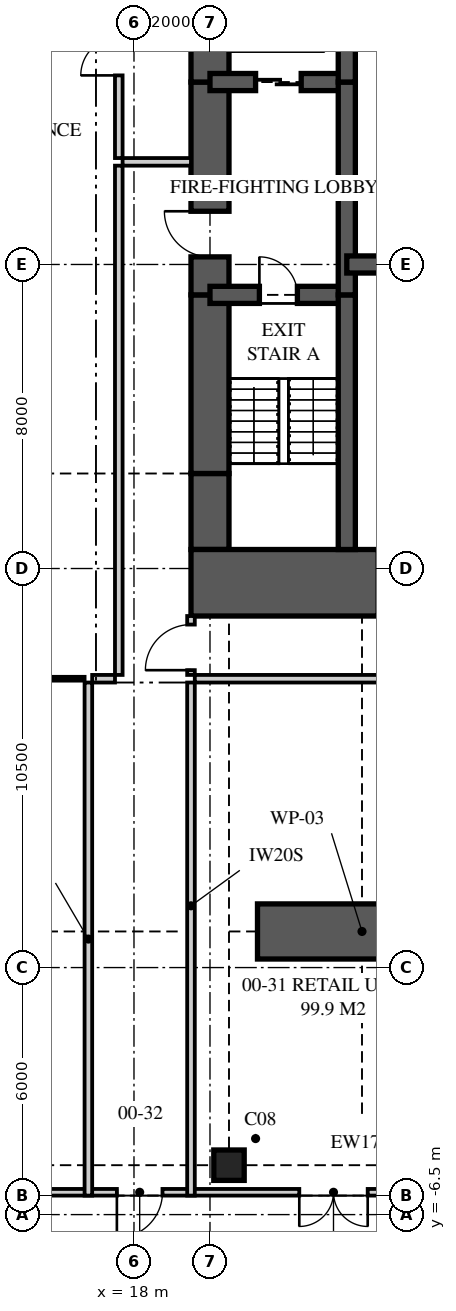
"""IFC4 building model, lengths in metres.
Left out: names, types, materials, properties, quantities, classifications, styles, units other than length and angle.
Written with IfcOpenShell. Run it as: python <this file> out.ifc"""

import sys

from ifc_helpers import new_model, si_unit, direction, frame, frame_2d, origin, origin_2d, place, context, subcontext, project, spatial, polyline, rectangle, outline, extrude, element, fill, save


model = new_model("IFC4")
c1 = context("Model", 3, precision=1e-05, world=origin(), true_north=direction((0.0, 1.0)))
c2 = subcontext(c1, "Body", "Model", "MODEL_VIEW")
j1 = project(units=[si_unit("LENGTHUNIT", "METRE"), si_unit("PLANEANGLEUNIT", "RADIAN")], contexts=[c1])
p1 = place(None, origin())
s1 = spatial("IfcSite", under=j1, at=p1, CompositionType="ELEMENT")
p2 = place(p1, origin())
s2 = spatial("IfcBuilding", under=s1, at=p2, CompositionType="ELEMENT")
p3 = place(p2, origin())
s3 = spatial("IfcBuildingStorey", under=s2, at=p3, CompositionType="ELEMENT", Elevation=0.0)
p4 = place(p3, frame((20.5, -5.2, 0.0), z_axis=(0.0, 0.0, 1.0), x_axis=(1.0, 0.0, 0.0)))
e1 = element("IfcColumn", 1, at=p4, inside=s3, PredefinedType="COLUMN", context=c2, shape_type="SweptSolid", body=[
    extrude(rectangle(XDim=0.8, YDim=0.8, at=origin_2d()), origin(), (0.0, 0.0, 1.0), 6.0),
])
p5 = place(p3, frame((19.5, 10.125, 0.0), z_axis=(0.0, 0.0, 1.0), x_axis=(1.0, 0.0, 0.0)))
e2 = element("IfcWall", 2, at=p5, inside=s3, PredefinedType="SHEAR", context=c2, shape_type="SweptSolid", body=[
    extrude(rectangle(XDim=6.5, YDim=1.75, at=frame_2d((3.25, 0.0))), origin(), (0.0, 0.0, 1.0), 6.0),
])
p6 = place(p5, frame((4.925, 0.0, 0.0)))
e3 = element("IfcOpeningElement", 3, at=p6, cuts=e2, PredefinedType="OPENING", context=c2, shape_type="SweptSolid", body=[
    extrude(rectangle(XDim=0.75, YDim=2.1, at=frame_2d((0.375, 1.05))), frame((0.0, 0.885, 0.0), z_axis=(0.0, -1.0, 0.0), x_axis=(1.0, 0.0, 0.0)), (0.0, 0.0, 1.0), 1.77),
])
p7 = place(p3, frame((20.0, 26.0, 0.0), z_axis=(0.0, 0.0, 1.0), x_axis=(0.0, -1.0, 0.0)))
e4 = element("IfcWall", 4, at=p7, inside=s3, PredefinedType="SHEAR", context=c2, shape_type="SweptSolid", body=[
    extrude(rectangle(XDim=2.7, YDim=1.0, at=frame_2d((1.35, 0.0))), origin(), (0.0, 0.0, 1.0), 6.0),
])
p8 = place(p3, frame((20.0, 23.3, 0.0), z_axis=(0.0, 0.0, 1.0), x_axis=(0.0, -1.0, 0.0)))
e5 = element("IfcWall", 5, at=p8, inside=s3, PredefinedType="SHEAR", context=c2, shape_type="SweptSolid", body=[
    extrude(rectangle(XDim=5.6, YDim=1.0, at=frame_2d((2.8, 0.0))), origin(), (0.0, 0.0, 1.0), 6.0),
])
p9 = place(p8, frame((3.4, 0.0, 0.0)))
e6 = element("IfcOpeningElement", 6, at=p9, cuts=e5, PredefinedType="OPENING", context=c2, shape_type="SweptSolid", body=[
    extrude(rectangle(XDim=1.2, YDim=2.2, at=frame_2d((0.6, 1.1))), frame((0.0, 0.51, 0.0), z_axis=(0.0, -1.0, 0.0), x_axis=(1.0, 0.0, 0.0)), (0.0, 0.0, 1.0), 1.02),
])
p10 = place(p3, frame((20.0, 17.7, 0.0), z_axis=(0.0, 0.0, 1.0), x_axis=(0.0, -1.0, 0.0)))
e7 = element("IfcWall", 7, at=p10, inside=s3, PredefinedType="SHEAR", context=c2, shape_type="SweptSolid", body=[
    extrude(rectangle(XDim=4.7, YDim=1.0, at=frame_2d((2.35, 0.0))), origin(), (0.0, 0.0, 1.0), 6.0),
])
p11 = place(p3, frame((20.0, 13.0, 0.0), z_axis=(0.0, 0.0, 1.0), x_axis=(0.0, -1.0, 0.0)))
e8 = element("IfcWall", 8, at=p11, inside=s3, PredefinedType="SHEAR", context=c2, shape_type="SweptSolid", body=[
    extrude(rectangle(XDim=2.0, YDim=1.0, at=frame_2d((1.0, 0.0))), origin(), (0.0, 0.0, 1.0), 6.0),
])
p12 = place(p3, frame((23.6, 11.0, 0.0), z_axis=(0.0, 0.0, 1.0), x_axis=(0.0, 1.0, 0.0)))
e9 = element("IfcWall", 9, at=p12, inside=s3, PredefinedType="SHEAR", context=c2, shape_type="SweptSolid", body=[
    extrude(rectangle(XDim=6.7, YDim=0.45, at=frame_2d((3.35, 0.0))), origin(), (0.0, 0.0, 1.0), 6.0),
])
p13 = place(p3, frame((23.6, 17.7, 0.0), z_axis=(0.0, 0.0, 1.0), x_axis=(0.0, 1.0, 0.0)))
e10 = element("IfcWall", 10, at=p13, inside=s3, PredefinedType="SHEAR", context=c2, shape_type="SweptSolid", body=[
    extrude(rectangle(XDim=5.6, YDim=0.45, at=frame_2d((2.8, 0.0))), origin(), (0.0, 0.0, 1.0), 6.0),
])
p14 = place(p3, frame((23.6, 23.3, 0.0), z_axis=(0.0, 0.0, 1.0), x_axis=(0.0, 1.0, 0.0)))
e11 = element("IfcWall", 11, at=p14, inside=s3, PredefinedType="SHEAR", context=c2, shape_type="SweptSolid", body=[
    extrude(rectangle(XDim=2.7, YDim=0.45, at=frame_2d((1.35, 0.0))), origin(), (0.0, 0.0, 1.0), 6.0),
])
p15 = place(p3, frame((20.0, 17.7, 0.0), z_axis=(0.0, 0.0, 1.0), x_axis=(1.0, 0.0, 0.0)))
e12 = element("IfcWall", 12, at=p15, inside=s3, PredefinedType="SHEAR", context=c2, shape_type="SweptSolid", body=[
    extrude(rectangle(XDim=3.6, YDim=0.45, at=frame_2d((1.8, 0.0))), origin(), (0.0, 0.0, 1.0), 6.0),
])
p16 = place(p15, frame((1.3, 0.0, 0.0)))
e13 = element("IfcOpeningElement", 13, at=p16, cuts=e12, PredefinedType="OPENING", context=c2, shape_type="SweptSolid", body=[
    extrude(rectangle(XDim=1.0, YDim=2.1, at=frame_2d((0.5, 1.05))), frame((0.0, 0.235, 0.0), z_axis=(0.0, -1.0, 0.0), x_axis=(1.0, 0.0, 0.0)), (0.0, 0.0, 1.0), 0.47),
])
p17 = place(p3, frame((20.0, 23.3, 0.0), z_axis=(0.0, 0.0, 1.0), x_axis=(1.0, 0.0, 0.0)))
e14 = element("IfcWall", 14, at=p17, inside=s3, PredefinedType="SHEAR", context=c2, shape_type="SweptSolid", body=[
    extrude(rectangle(XDim=3.6, YDim=0.45, at=frame_2d((1.8, 0.0))), origin(), (0.0, 0.0, 1.0), 6.0),
])
p18 = place(p17, frame((1.2, 0.0, 0.0)))
e15 = element("IfcOpeningElement", 15, at=p18, cuts=e14, PredefinedType="OPENING", context=c2, shape_type="SweptSolid", body=[
    extrude(rectangle(XDim=1.2, YDim=2.1, at=frame_2d((0.6, 1.05))), frame((0.0, 0.235, 0.0), z_axis=(0.0, -1.0, 0.0), x_axis=(1.0, 0.0, 0.0)), (0.0, 0.0, 1.0), 0.47),
])
p19 = place(p3, frame((23.6, 18.5, 0.0), z_axis=(0.0, 0.0, 1.0), x_axis=(1.0, 0.0, 0.0)))
e16 = element("IfcWall", 16, at=p19, inside=s3, PredefinedType="SHEAR", context=c2, shape_type="SweptSolid", body=[
    extrude(rectangle(XDim=2.4, YDim=0.45, at=frame_2d((1.2, 0.0))), origin(), (0.0, 0.0, 1.0), 6.0),
])
p20 = place(p3, frame((-9.2, -5.913, 0.0), z_axis=(0.0, 0.0, 1.0), x_axis=(1.0, 0.0, 0.0)))
e17 = element("IfcWall", 17, at=p20, inside=s3, PredefinedType="SOLIDWALL", context=c2, shape_type="SweptSolid", body=[
    extrude(rectangle(XDim=68.4, YDim=0.175, at=frame_2d((34.2, 0.0))), origin(), (0.0, 0.0, 1.0), 5.12),
])
p21 = place(p20, frame((4.819, 0.0, 0.0)))
e18 = element("IfcOpeningElement", 18, at=p21, cuts=e17, PredefinedType="OPENING", context=c2, shape_type="SweptSolid", body=[
    extrude(rectangle(XDim=1.8, YDim=2.7, at=frame_2d((0.9, 1.35))), frame((0.0, 0.097, 0.0), z_axis=(0.0, -1.0, 0.0), x_axis=(1.0, 0.0, 0.0)), (0.0, 0.0, 1.0), 0.195),
])
p22 = place(p20, frame((0.871, 0.0, 0.3)))
e19 = element("IfcOpeningElement", 19, at=p22, cuts=e17, PredefinedType="OPENING", context=c2, shape_type="SweptSolid", body=[
    extrude(rectangle(XDim=2.4, YDim=3.0, at=frame_2d((1.2, 1.5))), frame((0.0, 0.097, 0.0), z_axis=(0.0, -1.0, 0.0), x_axis=(1.0, 0.0, 0.0)), (0.0, 0.0, 1.0), 0.195),
])
p23 = place(p20, frame((8.334, 0.0, 0.3)))
e20 = element("IfcOpeningElement", 20, at=p23, cuts=e17, PredefinedType="OPENING", context=c2, shape_type="SweptSolid", body=[
    extrude(rectangle(XDim=2.4, YDim=3.0, at=frame_2d((1.2, 1.5))), frame((0.0, 0.097, 0.0), z_axis=(0.0, -1.0, 0.0), x_axis=(1.0, 0.0, 0.0)), (0.0, 0.0, 1.0), 0.195),
])
p24 = place(p20, frame((14.45, 0.0, 0.0)))
e21 = element("IfcOpeningElement", 21, at=p24, cuts=e17, PredefinedType="OPENING", context=c2, shape_type="SweptSolid", body=[
    extrude(rectangle(XDim=2.0, YDim=2.7, at=frame_2d((1.0, 1.35))), frame((0.0, 0.097, 0.0), z_axis=(0.0, -1.0, 0.0), x_axis=(1.0, 0.0, 0.0)), (0.0, 0.0, 1.0), 0.195),
])
p25 = place(p20, frame((22.17, 0.0, 0.0)))
e22 = element("IfcOpeningElement", 22, at=p25, cuts=e17, PredefinedType="OPENING", context=c2, shape_type="SweptSolid", body=[
    extrude(rectangle(XDim=1.8, YDim=2.7, at=frame_2d((0.9, 1.35))), frame((0.0, 0.097, 0.0), z_axis=(0.0, -1.0, 0.0), x_axis=(1.0, 0.0, 0.0)), (0.0, 0.0, 1.0), 0.195),
])
p26 = place(p20, frame((26.75, 0.0, 0.0)))
e23 = element("IfcOpeningElement", 23, at=p26, cuts=e17, PredefinedType="OPENING", context=c2, shape_type="SweptSolid", body=[
    extrude(rectangle(XDim=1.2, YDim=2.1, at=frame_2d((0.6, 1.05))), frame((0.0, 0.097, 0.0), z_axis=(0.0, -1.0, 0.0), x_axis=(1.0, 0.0, 0.0)), (0.0, 0.0, 1.0), 0.195),
])
p27 = place(p20, frame((31.55, 0.0, 0.0)))
e24 = element("IfcOpeningElement", 24, at=p27, cuts=e17, PredefinedType="OPENING", context=c2, shape_type="SweptSolid", body=[
    extrude(rectangle(XDim=1.8, YDim=2.7, at=frame_2d((0.9, 1.35))), frame((0.0, 0.097, 0.0), z_axis=(0.0, -1.0, 0.0), x_axis=(1.0, 0.0, 0.0)), (0.0, 0.0, 1.0), 0.195),
])
p28 = place(p20, frame((40.85, 0.0, 0.0)))
e25 = element("IfcOpeningElement", 25, at=p28, cuts=e17, PredefinedType="OPENING", context=c2, shape_type="SweptSolid", body=[
    extrude(rectangle(XDim=1.8, YDim=2.7, at=frame_2d((0.9, 1.35))), frame((0.0, 0.097, 0.0), z_axis=(0.0, -1.0, 0.0), x_axis=(1.0, 0.0, 0.0)), (0.0, 0.0, 1.0), 0.195),
])
p29 = place(p20, frame((43.445, 0.0, 0.3)))
e26 = element("IfcOpeningElement", 26, at=p29, cuts=e17, PredefinedType="OPENING", context=c2, shape_type="SweptSolid", body=[
    extrude(rectangle(XDim=2.4, YDim=3.0, at=frame_2d((1.2, 1.5))), frame((0.0, 0.097, 0.0), z_axis=(0.0, -1.0, 0.0), x_axis=(1.0, 0.0, 0.0)), (0.0, 0.0, 1.0), 0.195),
])
p30 = place(p20, frame((47.7, 0.0, 0.0)))
e27 = element("IfcOpeningElement", 27, at=p30, cuts=e17, PredefinedType="OPENING", context=c2, shape_type="SweptSolid", body=[
    extrude(rectangle(XDim=1.2, YDim=2.1, at=frame_2d((0.6, 1.05))), frame((0.0, 0.097, 0.0), z_axis=(0.0, -1.0, 0.0), x_axis=(1.0, 0.0, 0.0)), (0.0, 0.0, 1.0), 0.195),
])
p31 = place(p20, frame((52.485, 0.0, 0.0)))
e28 = element("IfcOpeningElement", 28, at=p31, cuts=e17, PredefinedType="OPENING", context=c2, shape_type="SweptSolid", body=[
    extrude(rectangle(XDim=1.8, YDim=2.7, at=frame_2d((0.9, 1.35))), frame((0.0, 0.097, 0.0), z_axis=(0.0, -1.0, 0.0), x_axis=(1.0, 0.0, 0.0)), (0.0, 0.0, 1.0), 0.195),
])
p32 = place(p20, frame((63.159, 0.0, 0.0)))
e29 = element("IfcOpeningElement", 29, at=p32, cuts=e17, PredefinedType="OPENING", context=c2, shape_type="SweptSolid", body=[
    extrude(rectangle(XDim=1.8, YDim=2.7, at=frame_2d((0.9, 1.35))), frame((0.0, 0.097, 0.0), z_axis=(0.0, -1.0, 0.0), x_axis=(1.0, 0.0, 0.0)), (0.0, 0.0, 1.0), 0.195),
])
p33 = place(p20, frame((58.92, 0.0, 0.3)))
e30 = element("IfcOpeningElement", 30, at=p33, cuts=e17, PredefinedType="OPENING", context=c2, shape_type="SweptSolid", body=[
    extrude(rectangle(XDim=2.4, YDim=3.0, at=frame_2d((1.2, 1.5))), frame((0.0, 0.097, 0.0), z_axis=(0.0, -1.0, 0.0), x_axis=(1.0, 0.0, 0.0)), (0.0, 0.0, 1.0), 0.195),
])
p34 = place(p3, frame((9.55, 7.6, 0.0), z_axis=(0.0, 0.0, 1.0), x_axis=(1.0, 0.0, 0.0)))
e31 = element("IfcWall", 31, at=p34, inside=s3, PredefinedType="PARTITIONING", context=c2, shape_type="SweptSolid", body=[
    extrude(outline(polyline([(0.0, 0.0), (7.15, 0.0), (7.15, 5.72), (4.71, 5.72), (4.71, 5.12), (2.19, 5.12), (2.19, 5.72), (0.0, 5.72), (0.0, 0.0)])), frame((0.0, 0.05, 0.0), z_axis=(0.0, -1.0, 0.0), x_axis=(1.0, 0.0, 0.0)), (0.0, 0.0, 1.0), 0.1),
])
p35 = place(p3, frame((17.6, 21.3, 0.0), z_axis=(0.0, 0.0, 1.0), x_axis=(0.0, 1.0, 0.0)))
e32 = element("IfcWall", 32, at=p35, inside=s3, PredefinedType="PARTITIONING", context=c2, shape_type="SweptSolid", body=[
    extrude(outline(polyline([(0.0, 0.0), (6.45, 0.0), (6.45, 5.72), (5.01, 5.72), (5.01, 5.12), (2.39, 5.12), (2.39, 5.72), (0.0, 5.72), (0.0, 0.0)])), frame((0.0, 0.1, 0.0), z_axis=(0.0, -1.0, 0.0), x_axis=(1.0, 0.0, 0.0)), (0.0, 0.0, 1.0), 0.2),
])
p36 = place(p35, frame((2.175, 0.0, 0.0)))
e33 = element("IfcOpeningElement", 33, at=p36, cuts=e32, PredefinedType="OPENING", context=c2, shape_type="SweptSolid", body=[
    extrude(rectangle(XDim=2.0, YDim=2.4, at=frame_2d((1.0, 1.2))), frame((0.0, 0.11, 0.0), z_axis=(0.0, -1.0, 0.0), x_axis=(1.0, 0.0, 0.0)), (0.0, 0.0, 1.0), 0.22),
])
p37 = place(p3, frame((17.6, 7.7, 0.0), z_axis=(0.0, 0.0, 1.0), x_axis=(0.0, 1.0, 0.0)))
e34 = element("IfcWall", 34, at=p37, inside=s3, PredefinedType="SOLIDWALL", context=c2, shape_type="SweptSolid", body=[
    extrude(outline(polyline([(0.0, 0.0), (13.4, 0.0), (13.4, 5.72), (6.61, 5.72), (6.61, 5.12), (3.99, 5.12), (3.99, 5.72), (0.0, 5.72), (0.0, 0.0)])), frame((0.0, 0.1, 0.0), z_axis=(0.0, -1.0, 0.0), x_axis=(1.0, 0.0, 0.0)), (0.0, 0.0, 1.0), 0.2),
])
p38 = place(p3, frame((16.9, 7.6, 0.0), z_axis=(0.0, 0.0, 1.0), x_axis=(1.0, 0.0, 0.0)))
e35 = element("IfcWall", 35, at=p38, inside=s3, PredefinedType="SOLIDWALL", context=c2, shape_type="SweptSolid", body=[
    extrude(rectangle(XDim=0.6, YDim=0.2, at=frame_2d((0.3, 0.0))), origin(), (0.0, 0.0, 1.0), 5.72),
])
p39 = place(p3, frame((16.8, -6.0, 0.0), z_axis=(0.0, 0.0, 1.0), x_axis=(0.0, 1.0, 0.0)))
e36 = element("IfcWall", 36, at=p39, inside=s3, PredefinedType="SOLIDWALL", context=c2, shape_type="SweptSolid", body=[
    extrude(outline(polyline([(0.0, 0.0), (13.5, 0.0), (13.5, 5.72), (8.26, 5.72), (8.26, 5.12), (5.64, 5.12), (5.64, 5.72), (2.11, 5.72), (2.11, 5.12), (0.0, 5.12), (0.0, 5.72), (0.0, 0.0)])), frame((0.0, 0.1, 0.0), z_axis=(0.0, -1.0, 0.0), x_axis=(1.0, 0.0, 0.0)), (0.0, 0.0, 1.0), 0.2),
])
p40 = place(p3, frame((17.7, 21.2, 0.0), z_axis=(0.0, 0.0, 1.0), x_axis=(1.0, 0.0, 0.0)))
e37 = element("IfcWall", 37, at=p40, inside=s3, PredefinedType="SOLIDWALL", context=c2, shape_type="SweptSolid", body=[
    extrude(rectangle(XDim=1.8, YDim=0.2, at=frame_2d((0.9, 0.0))), origin(), (0.0, 0.0, 1.0), 5.72),
])
p41 = place(p3, frame((19.5, -6.0, 0.0), z_axis=(0.0, 0.0, 1.0), x_axis=(0.0, 1.0, 0.0)))
e38 = element("IfcWall", 38, at=p41, inside=s3, PredefinedType="SOLIDWALL", context=c2, shape_type="SweptSolid", body=[
    extrude(outline(polyline([(0.0, 0.0), (13.5, 0.0), (13.5, 5.72), (13.5, 5.12), (2.11, 5.12), (0.0, 5.12), (0.0, 5.72), (0.0, 0.0)])), frame((0.0, 0.1, 0.0), z_axis=(0.0, -1.0, 0.0), x_axis=(1.0, 0.0, 0.0)), (0.0, 0.0, 1.0), 0.2),
])
p42 = place(p3, frame((19.6, 7.6, 0.0), z_axis=(0.0, 0.0, 1.0), x_axis=(1.0, 0.0, 0.0)))
e39 = element("IfcWall", 39, at=p42, inside=s3, PredefinedType="PARTITIONING", context=c2, shape_type="SweptSolid", body=[
    extrude(outline(polyline([(0.0, 0.0), (7.35, 0.0), (7.35, 5.72), (5.71, 5.72), (5.71, 5.12), (3.09, 5.12), (3.09, 5.72), (2.21, 5.72), (2.21, 5.12), (0.0, 5.12), (0.0, 5.72), (0.0, 0.0)])), frame((0.0, 0.1, 0.0), z_axis=(0.0, -1.0, 0.0), x_axis=(1.0, 0.0, 0.0)), (0.0, 0.0, 1.0), 0.2),
])
p43 = place(p3, frame((19.5, 7.7, 0.0), z_axis=(0.0, 0.0, 1.0), x_axis=(0.0, 1.0, 0.0)))
e40 = element("IfcWall", 40, at=p43, inside=s3, PredefinedType="SOLIDWALL", context=c2, shape_type="SweptSolid", body=[
    extrude(outline(polyline([(0.0, 0.0), (1.55, 0.0), (1.55, 5.72), (1.55, 5.12), (0.0, 5.12), (0.0, 5.72), (0.0, 0.0)])), frame((0.0, 0.1, 0.0), z_axis=(0.0, -1.0, 0.0), x_axis=(1.0, 0.0, 0.0)), (0.0, 0.0, 1.0), 0.2),
])
p44 = place(p43, frame((0.125, 0.0, 0.0)))
e41 = element("IfcOpeningElement", 41, at=p44, cuts=e40, PredefinedType="OPENING", context=c2, shape_type="SweptSolid", body=[
    extrude(rectangle(XDim=1.2, YDim=2.2, at=frame_2d((0.6, 1.1))), frame((0.0, 0.11, 0.0), z_axis=(0.0, -1.0, 0.0), x_axis=(1.0, 0.0, 0.0)), (0.0, 0.0, 1.0), 0.22),
])
p45 = place(p3, frame((21.25, 0.95, 0.0), z_axis=(0.0, 0.0, 1.0), x_axis=(1.0, 0.0, 0.0)))
e42 = element("IfcWall", 42, at=p45, inside=s3, PredefinedType="SHEAR", context=c2, shape_type="SweptSolid", body=[
    extrude(rectangle(XDim=5.5, YDim=1.45, at=frame_2d((2.75, 0.0))), origin(), (0.0, 0.0, 1.0), 6.0),
])
p46 = place(p26, frame((1.2, 0.0, 0.0), z_axis=(0.0, 0.0, 1.0), x_axis=(-1.0, 0.0, 0.0)))
e43 = element("IfcDoor", 43, at=p46, inside=s3, OperationType="SINGLE_SWING_RIGHT", PredefinedType="DOOR", context=c2, shape_type="SweptSolid", body=[
    extrude(rectangle(XDim=1.2, YDim=2.1, at=frame_2d((0.6, 1.05))), frame((0.0, 0.025, 0.0), z_axis=(0.0, -1.0, 0.0), x_axis=(1.0, 0.0, 0.0)), (0.0, 0.0, 1.0), 0.05),
])
fill(e23, e43)
p47 = place(p27, frame((1.8, 0.0, 0.0), z_axis=(0.0, 0.0, 1.0), x_axis=(-1.0, 0.0, 0.0)))
e44 = element("IfcDoor", 44, at=p47, inside=s3, OperationType="DOUBLE_DOOR_SINGLE_SWING", PredefinedType="DOOR", context=c2, shape_type="SweptSolid", body=[
    extrude(rectangle(XDim=1.8, YDim=2.7, at=frame_2d((0.9, 1.35))), frame((0.0, 0.025, 0.0), z_axis=(0.0, -1.0, 0.0), x_axis=(1.0, 0.0, 0.0)), (0.0, 0.0, 1.0), 0.05),
])
fill(e24, e44)
p48 = place(p36, origin())
e45 = element("IfcDoor", 45, at=p48, inside=s3, OperationType="DOUBLE_DOOR_SINGLE_SWING", PredefinedType="DOOR", context=c2, shape_type="SweptSolid", body=[
    extrude(rectangle(XDim=2.0, YDim=2.4, at=frame_2d((1.0, 1.2))), frame((0.0, 0.025, 0.0), z_axis=(0.0, -1.0, 0.0), x_axis=(1.0, 0.0, 0.0)), (0.0, 0.0, 1.0), 0.05),
])
fill(e33, e45)
p49 = place(p44, origin())
e46 = element("IfcDoor", 46, at=p49, inside=s3, OperationType="SINGLE_SWING_LEFT", PredefinedType="DOOR", context=c2, shape_type="SweptSolid", body=[
    extrude(rectangle(XDim=1.2, YDim=2.2, at=frame_2d((0.6, 1.1))), frame((0.0, 0.025, 0.0), z_axis=(0.0, -1.0, 0.0), x_axis=(1.0, 0.0, 0.0)), (0.0, 0.0, 1.0), 0.05),
])
fill(e41, e46)
p50 = place(p16, origin())
e47 = element("IfcDoor", 47, at=p50, inside=s3, OperationType="SINGLE_SWING_LEFT", PredefinedType="DOOR", context=c2, shape_type="SweptSolid", body=[
    extrude(rectangle(XDim=1.0, YDim=2.1, at=frame_2d((0.5, 1.05))), frame((0.0, 0.025, 0.0), z_axis=(0.0, -1.0, 0.0), x_axis=(1.0, 0.0, 0.0)), (0.0, 0.0, 1.0), 0.05),
])
fill(e13, e47)
p51 = place(p9, frame((1.2, 0.0, 0.0), z_axis=(0.0, 0.0, 1.0), x_axis=(-1.0, 0.0, 0.0)))
e48 = element("IfcDoor", 48, at=p51, inside=s3, OperationType="SINGLE_SWING_RIGHT", PredefinedType="DOOR", context=c2, shape_type="SweptSolid", body=[
    extrude(rectangle(XDim=1.2, YDim=2.2, at=frame_2d((0.6, 1.1))), frame((0.0, 0.025, 0.0), z_axis=(0.0, -1.0, 0.0), x_axis=(1.0, 0.0, 0.0)), (0.0, 0.0, 1.0), 0.05),
])
fill(e6, e48)
p52 = place(p18, origin())
e49 = element("IfcDoor", 49, at=p52, inside=s3, OperationType="SLIDING_TO_LEFT", PredefinedType="DOOR", context=c2, shape_type="SweptSolid", body=[
    extrude(rectangle(XDim=1.2, YDim=2.1, at=frame_2d((0.6, 1.05))), frame((0.0, 0.025, 0.0), z_axis=(0.0, -1.0, 0.0), x_axis=(1.0, 0.0, 0.0)), (0.0, 0.0, 1.0), 0.05),
])
fill(e15, e49)
save(model, sys.argv[1])
